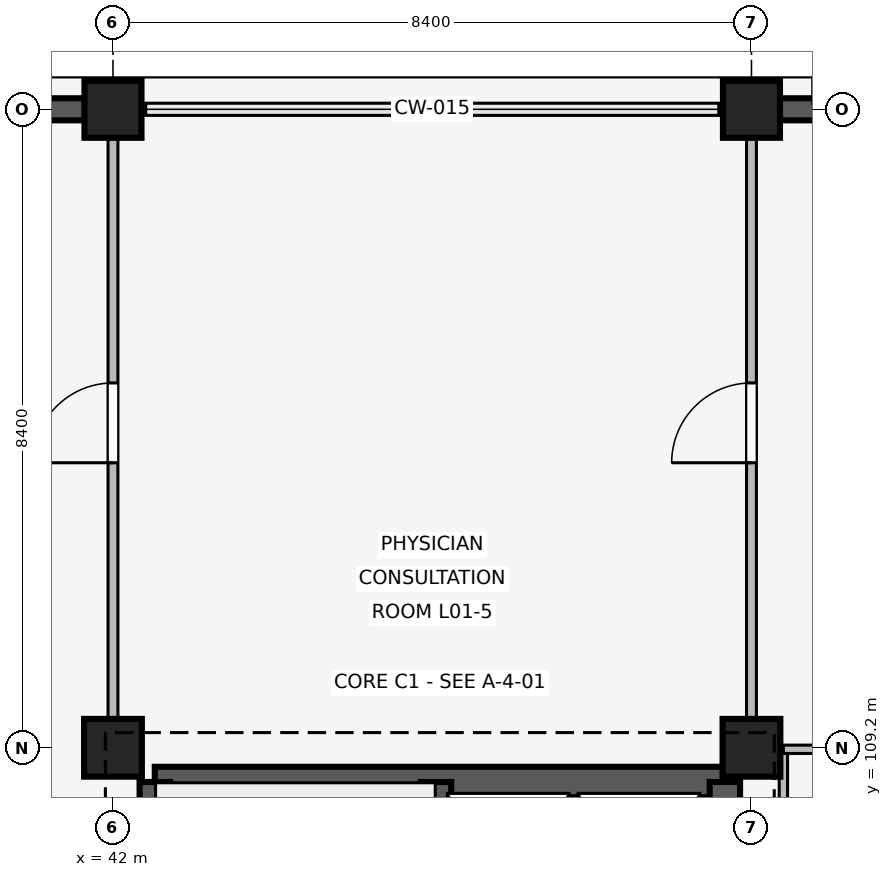
"""IFC4 building model, lengths in metres.
Left out: names, types, materials, properties, quantities, classifications, styles, units other than length and angle.
Written with IfcOpenShell. Run it as: python <this file> out.ifc"""

import sys

from ifc_helpers import new_model, si_unit, direction, frame, frame_2d, origin, origin_2d, place, context, subcontext, project, spatial, rectangle, extrude, element, fill, save


model = new_model("IFC4")
c1 = context("Model", 3, precision=1e-05, world=origin(), true_north=direction((0.0, 1.0)))
c2 = subcontext(c1, "Body", "Model", "MODEL_VIEW")
j1 = project(units=[si_unit("LENGTHUNIT", "METRE"), si_unit("PLANEANGLEUNIT", "RADIAN")], contexts=[c1])
p1 = place(None, origin())
s1 = spatial("IfcSite", under=j1, at=p1, CompositionType="ELEMENT")
p2 = place(p1, origin())
s2 = spatial("IfcBuilding", under=s1, at=p2, CompositionType="ELEMENT")
p3 = place(p2, frame((0.0, 0.0, 4.8)))
s3 = spatial("IfcBuildingStorey", under=s2, at=p3, CompositionType="ELEMENT", Elevation=4.8)
p4 = place(p3, frame((42.0, 109.2, 0.0), z_axis=(0.0, 0.0, 1.0), x_axis=(1.0, 0.0, 0.0)))
e1 = element("IfcColumn", 1, at=p4, inside=s3, PredefinedType="COLUMN", context=c2, shape_type="SweptSolid", body=[
    extrude(rectangle(XDim=0.76, YDim=0.76, at=origin_2d()), origin(), (0.0, 0.0, 1.0), 3.3),
])
p5 = place(p3, frame((42.0, 117.6, 0.0), z_axis=(0.0, 0.0, 1.0), x_axis=(1.0, 0.0, 0.0)))
e2 = element("IfcColumn", 2, at=p5, inside=s3, PredefinedType="COLUMN", context=c2, shape_type="SweptSolid", body=[
    extrude(rectangle(XDim=0.75, YDim=0.75, at=origin_2d()), origin(), (0.0, 0.0, 1.0), 3.3),
])
p6 = place(p3, frame((50.4, 109.2, 0.0), z_axis=(0.0, 0.0, 1.0), x_axis=(1.0, 0.0, 0.0)))
e3 = element("IfcColumn", 3, at=p6, inside=s3, PredefinedType="COLUMN", context=c2, shape_type="SweptSolid", body=[
    extrude(rectangle(XDim=0.76, YDim=0.76, at=origin_2d()), origin(), (0.0, 0.0, 1.0), 3.3),
])
p7 = place(p3, frame((50.4, 117.6, 0.0), z_axis=(0.0, 0.0, 1.0), x_axis=(1.0, 0.0, 0.0)))
e4 = element("IfcColumn", 4, at=p7, inside=s3, PredefinedType="COLUMN", context=c2, shape_type="SweptSolid", body=[
    extrude(rectangle(XDim=0.75, YDim=0.75, at=origin_2d()), origin(), (0.0, 0.0, 1.0), 3.3),
])
p8 = place(p3, frame((33.97, 117.6, 0.0), z_axis=(0.0, 0.0, 1.0), x_axis=(1.0, 0.0, 0.0)))
e5 = element("IfcWall", 5, at=p8, inside=s3, PredefinedType="SOLIDWALL", context=c2, shape_type="SweptSolid", body=[
    extrude(rectangle(XDim=7.66, YDim=0.29, at=frame_2d((3.83, 0.0))), origin(), (0.0, 0.0, 1.0), 2.42),
])
p9 = place(p8, frame((1.032, 0.0, 0.85)))
e6 = element("IfcOpeningElement", 6, at=p9, cuts=e5, PredefinedType="OPENING", context=c2, shape_type="SweptSolid", body=[
    extrude(rectangle(XDim=1.46, YDim=0.85, at=frame_2d((0.73, 0.425))), frame((0.0, 0.155, 0.0), z_axis=(0.0, -1.0, 0.0), x_axis=(1.0, 0.0, 0.0)), (0.0, 0.0, 1.0), 0.31),
])
p10 = place(p8, frame((5.168, 0.0, 0.85)))
e7 = element("IfcOpeningElement", 7, at=p10, cuts=e5, PredefinedType="OPENING", context=c2, shape_type="SweptSolid", body=[
    extrude(rectangle(XDim=1.46, YDim=0.85, at=frame_2d((0.73, 0.425))), frame((0.0, 0.155, 0.0), z_axis=(0.0, -1.0, 0.0), x_axis=(1.0, 0.0, 0.0)), (0.0, 0.0, 1.0), 0.31),
])
p11 = place(p3, frame((50.77, 117.6, 0.0), z_axis=(0.0, 0.0, 1.0), x_axis=(1.0, 0.0, 0.0)))
e8 = element("IfcWall", 8, at=p11, inside=s3, PredefinedType="SOLIDWALL", context=c2, shape_type="SweptSolid", body=[
    extrude(rectangle(XDim=7.66, YDim=0.29, at=frame_2d((3.83, 0.0))), origin(), (0.0, 0.0, 1.0), 2.42),
])
p12 = place(p11, frame((1.032, 0.0, 0.85)))
e9 = element("IfcOpeningElement", 9, at=p12, cuts=e8, PredefinedType="OPENING", context=c2, shape_type="SweptSolid", body=[
    extrude(rectangle(XDim=1.46, YDim=0.85, at=frame_2d((0.73, 0.425))), frame((0.0, 0.155, 0.0), z_axis=(0.0, -1.0, 0.0), x_axis=(1.0, 0.0, 0.0)), (0.0, 0.0, 1.0), 0.31),
])
p13 = place(p11, frame((5.168, 0.0, 0.85)))
e10 = element("IfcOpeningElement", 10, at=p13, cuts=e8, PredefinedType="OPENING", context=c2, shape_type="SweptSolid", body=[
    extrude(rectangle(XDim=1.46, YDim=0.85, at=frame_2d((0.73, 0.425))), frame((0.0, 0.155, 0.0), z_axis=(0.0, -1.0, 0.0), x_axis=(1.0, 0.0, 0.0)), (0.0, 0.0, 1.0), 0.31),
])
p14 = place(p3, frame((42.55, 108.75, 0.0), z_axis=(0.0, 0.0, 1.0), x_axis=(1.0, 0.0, 0.0)))
e11 = element("IfcWall", 11, at=p14, inside=s3, PredefinedType="SHEAR", context=c2, shape_type="SweptSolid", body=[
    extrude(rectangle(XDim=7.5, YDim=0.4, at=frame_2d((3.75, 0.0))), origin(), (0.0, 0.0, 1.0), 3.02),
])
p15 = place(p3, frame((42.55, 101.2, 0.0), z_axis=(0.0, 0.0, 1.0), x_axis=(0.0, 1.0, 0.0)))
e12 = element("IfcWall", 12, at=p15, inside=s3, PredefinedType="SHEAR", context=c2, shape_type="SweptSolid", body=[
    extrude(rectangle(XDim=7.55, YDim=0.4, at=frame_2d((3.775, 0.0))), origin(), (0.0, 0.0, 1.0), 3.02),
])
p16 = place(p15, frame((0.28, 0.0, 0.0)))
e13 = element("IfcOpeningElement", 13, at=p16, cuts=e12, PredefinedType="OPENING", context=c2, shape_type="SweptSolid", body=[
    extrude(rectangle(XDim=1.0, YDim=2.15, at=frame_2d((0.5, 1.075))), frame((0.0, 0.21, 0.0), z_axis=(0.0, -1.0, 0.0), x_axis=(1.0, 0.0, 0.0)), (0.0, 0.0, 1.0), 0.42),
])
p17 = place(p3, frame((50.05, 101.2, 0.0), z_axis=(0.0, 0.0, 1.0), x_axis=(0.0, 1.0, 0.0)))
e14 = element("IfcWall", 14, at=p17, inside=s3, PredefinedType="SHEAR", context=c2, shape_type="SweptSolid", body=[
    extrude(rectangle(XDim=7.55, YDim=0.4, at=frame_2d((3.775, 0.0))), origin(), (0.0, 0.0, 1.0), 3.02),
])
p18 = place(p17, frame((2.4, 0.0, 0.0)))
e15 = element("IfcOpeningElement", 15, at=p18, cuts=e14, PredefinedType="OPENING", context=c2, shape_type="SweptSolid", body=[
    extrude(rectangle(XDim=1.2, YDim=2.2, at=frame_2d((0.6, 1.1))), frame((0.0, 0.21, 0.0), z_axis=(0.0, -1.0, 0.0), x_axis=(1.0, 0.0, 0.0)), (0.0, 0.0, 1.0), 0.42),
])
p19 = place(p3, frame((46.25, 101.2, 0.0), z_axis=(0.0, 0.0, 1.0), x_axis=(0.0, 1.0, 0.0)))
e16 = element("IfcWall", 16, at=p19, inside=s3, PredefinedType="SHEAR", context=c2, shape_type="SweptSolid", body=[
    extrude(rectangle(XDim=7.55, YDim=0.4, at=frame_2d((3.775, 0.0))), origin(), (0.0, 0.0, 1.0), 3.02),
])
p20 = place(p19, frame((0.28, 0.0, 0.0)))
e17 = element("IfcOpeningElement", 17, at=p20, cuts=e16, PredefinedType="OPENING", context=c2, shape_type="SweptSolid", body=[
    extrude(rectangle(XDim=1.0, YDim=2.15, at=frame_2d((0.5, 1.075))), frame((0.0, 0.21, 0.0), z_axis=(0.0, -1.0, 0.0), x_axis=(1.0, 0.0, 0.0)), (0.0, 0.0, 1.0), 0.42),
])
p21 = place(p3, frame((42.0, 109.55, 0.0), z_axis=(0.0, 0.0, 1.0), x_axis=(0.0, 1.0, 0.0)))
e18 = element("IfcWall", 18, at=p21, inside=s3, PredefinedType="PARTITIONING", context=c2, shape_type="SweptSolid", body=[
    extrude(rectangle(XDim=7.91, YDim=0.13, at=frame_2d((3.955, 0.0))), origin(), (0.0, 0.0, 1.0), 2.4),
])
p22 = place(p21, frame((3.4, 0.0, 0.0)))
e19 = element("IfcOpeningElement", 19, at=p22, cuts=e18, PredefinedType="OPENING", context=c2, shape_type="SweptSolid", body=[
    extrude(rectangle(XDim=1.05, YDim=2.2, at=frame_2d((0.525, 1.1))), frame((0.0, 0.075, 0.0), z_axis=(0.0, -1.0, 0.0), x_axis=(1.0, 0.0, 0.0)), (0.0, 0.0, 1.0), 0.15),
])
p23 = place(p3, frame((50.4, 109.55, 0.0), z_axis=(0.0, 0.0, 1.0), x_axis=(0.0, 1.0, 0.0)))
e20 = element("IfcWall", 20, at=p23, inside=s3, PredefinedType="PARTITIONING", context=c2, shape_type="SweptSolid", body=[
    extrude(rectangle(XDim=7.91, YDim=0.13, at=frame_2d((3.955, 0.0))), origin(), (0.0, 0.0, 1.0), 2.4),
])
p24 = place(p23, frame((3.4, 0.0, 0.0)))
e21 = element("IfcOpeningElement", 21, at=p24, cuts=e20, PredefinedType="OPENING", context=c2, shape_type="SweptSolid", body=[
    extrude(rectangle(XDim=1.05, YDim=2.2, at=frame_2d((0.525, 1.1))), frame((0.0, 0.075, 0.0), z_axis=(0.0, -1.0, 0.0), x_axis=(1.0, 0.0, 0.0)), (0.0, 0.0, 1.0), 0.15),
])
p25 = place(p3, frame((50.82, 106.57, 0.0), z_axis=(0.0, 0.0, 1.0), x_axis=(0.0, 1.0, 0.0)))
e22 = element("IfcWall", 22, at=p25, inside=s3, PredefinedType="PARTITIONING", context=c2, shape_type="SweptSolid", body=[
    extrude(rectangle(XDim=2.61, YDim=0.11, at=frame_2d((1.305, 0.0))), origin(), (0.0, 0.0, 1.0), 2.4),
])
p26 = place(p3, frame((50.82, 109.18, 0.0), z_axis=(0.0, 0.0, 1.0), x_axis=(1.0, 0.0, 0.0)))
e23 = element("IfcWall", 23, at=p26, inside=s3, PredefinedType="PARTITIONING", context=c2, shape_type="SweptSolid", body=[
    extrude(rectangle(XDim=1.98, YDim=0.11, at=frame_2d((0.99, 0.0))), origin(), (0.0, 0.0, 1.0), 2.4),
])
p27 = place(p26, frame((0.54, 0.0, 0.0)))
e24 = element("IfcOpeningElement", 24, at=p27, cuts=e23, PredefinedType="OPENING", context=c2, shape_type="SweptSolid", body=[
    extrude(rectangle(XDim=0.9, YDim=2.1, at=frame_2d((0.45, 1.05))), frame((0.0, 0.065, 0.0), z_axis=(0.0, -1.0, 0.0), x_axis=(1.0, 0.0, 0.0)), (0.0, 0.0, 1.0), 0.13),
])
p28 = place(p22, origin())
e25 = element("IfcDoor", 25, at=p28, inside=s3, OperationType="SINGLE_SWING_LEFT", PredefinedType="DOOR", context=c2, shape_type="SweptSolid", body=[
    extrude(rectangle(XDim=1.05, YDim=2.2, at=frame_2d((0.525, 1.1))), frame((0.0, 0.025, 0.0), z_axis=(0.0, -1.0, 0.0), x_axis=(1.0, 0.0, 0.0)), (0.0, 0.0, 1.0), 0.05),
])
fill(e19, e25)
p29 = place(p24, origin())
e26 = element("IfcDoor", 26, at=p29, inside=s3, OperationType="SINGLE_SWING_LEFT", PredefinedType="DOOR", context=c2, shape_type="SweptSolid", body=[
    extrude(rectangle(XDim=1.05, YDim=2.2, at=frame_2d((0.525, 1.1))), frame((0.0, 0.025, 0.0), z_axis=(0.0, -1.0, 0.0), x_axis=(1.0, 0.0, 0.0)), (0.0, 0.0, 1.0), 0.05),
])
fill(e21, e26)
save(model, sys.argv[1])
